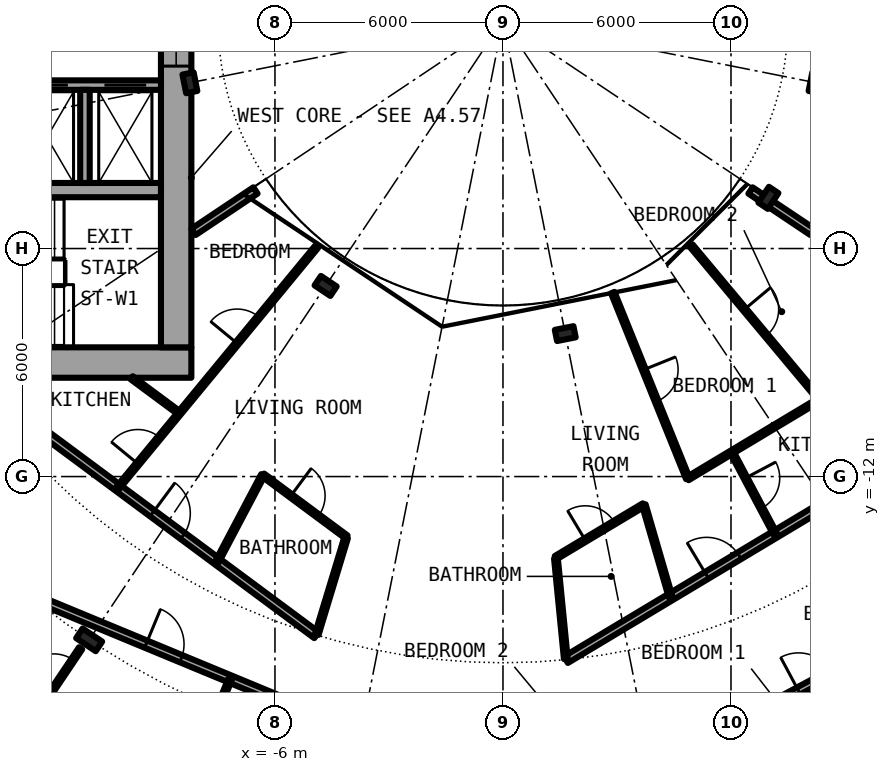
"""IFC4 building model, lengths in metres.
Left out: names, types, materials, properties, quantities, classifications, styles, units other than length and angle.
Written with IfcOpenShell. Run it as: python <this file> out.ifc"""

import sys

from ifc_helpers import new_model, si_unit, direction, frame, frame_2d, origin, origin_2d, place, context, subcontext, project, spatial, rectangle, i_section, extrude, element, fill, save


model = new_model("IFC4")
c1 = context("Model", 3, precision=1e-05, world=origin(), true_north=direction((0.0, 1.0)))
c2 = subcontext(c1, "Body", "Model", "MODEL_VIEW")
j1 = project(units=[si_unit("LENGTHUNIT", "METRE"), si_unit("PLANEANGLEUNIT", "RADIAN")], contexts=[c1])
p1 = place(None, origin())
s1 = spatial("IfcSite", under=j1, at=p1, CompositionType="ELEMENT")
p2 = place(p1, origin())
s2 = spatial("IfcBuilding", under=s1, at=p2, CompositionType="ELEMENT")
p3 = place(p2, frame((0.0, 0.0, 50.25)))
s3 = spatial("IfcBuildingStorey", under=s2, at=p3, CompositionType="ELEMENT", Elevation=50.25)
p4 = place(p3, frame((-10.889, -16.297, 0.0), z_axis=(0.0, 0.0, 1.0), x_axis=(-0.55557023302, -0.831469612303, 0.0)))
e1 = element("IfcColumn", 1, at=p4, inside=s3, PredefinedType="COLUMN", context=c2, shape_type="SweptSolid", body=[
    extrude(i_section(OverallWidth=0.305, OverallDepth=0.62, WebThickness=0.021, FlangeThickness=0.04, FilletRadius=0.027, at=origin_2d()), origin(), (0.0, 0.0, 1.0), 3.05),
])
for number, where, z_axis, x_axis in (
    (2, (-8.239, -1.639, 0.0), (0.0, 0.0, 1.0), (-0.981, -0.195, 0.0)),
    (3, (-4.667, -6.984, 0.0), (0.0, 0.0, 1.0), (-0.556, -0.831, 0.0)),
    (4, (1.639, -8.239, 0.0), (0.0, 0.0, 1.0), (0.195, -0.981, 0.0)),
    (5, (6.984, -4.667, 0.0), (0.0, 0.0, 1.0), (0.831, -0.556, 0.0)),
    (6, (8.239, -1.639, 0.0), (0.0, 0.0, 1.0), (0.981, -0.195, 0.0)),
):
    element("IfcColumn", number, at=place(p3, frame(where, z_axis=z_axis, x_axis=x_axis)), inside=s3, PredefinedType="COLUMN", context=c2, shape_type="SweptSolid", body=[
        extrude(i_section(OverallWidth=0.3, OverallDepth=0.5, WebThickness=0.014, FlangeThickness=0.028, FilletRadius=0.027, at=origin_2d()), origin(), (0.0, 0.0, 1.0), 3.05),
    ])
p5 = place(p3, frame((-22.4, -9.0, 0.0), z_axis=(0.0, 0.0, 1.0), x_axis=(1.0, 0.0, 0.0)))
e7 = element("IfcWall", 7, at=p5, inside=s3, PredefinedType="SHEAR", context=c2, shape_type="SweptSolid", body=[
    extrude(rectangle(XDim=14.2, YDim=0.8, at=frame_2d((7.1, 0.0))), origin(), (0.0, 0.0, 1.0), 3.05),
])
p6 = place(p5, frame((1.325, 0.0, 0.0)))
e8 = element("IfcOpeningElement", 8, at=p6, cuts=e7, PredefinedType="OPENING", context=c2, shape_type="SweptSolid", body=[
    extrude(rectangle(XDim=1.2, YDim=2.3, at=frame_2d((0.6, 1.15))), frame((0.0, 0.41, 0.0), z_axis=(0.0, -1.0, 0.0), x_axis=(1.0, 0.0, 0.0)), (0.0, 0.0, 1.0), 0.82),
])
p7 = place(p3, frame((-8.6, 8.6, 0.0), z_axis=(0.0, 0.0, 1.0), x_axis=(0.0, -1.0, 0.0)))
e9 = element("IfcWall", 9, at=p7, inside=s3, PredefinedType="SHEAR", context=c2, shape_type="SweptSolid", body=[
    extrude(rectangle(XDim=17.2, YDim=0.8, at=frame_2d((8.6, 0.0))), origin(), (0.0, 0.0, 1.0), 3.05),
])
p8 = place(p7, frame((7.4, 0.0, 0.1)))
e10 = element("IfcOpeningElement", 10, at=p8, cuts=e9, PredefinedType="OPENING", context=c2, shape_type="SweptSolid", body=[
    extrude(rectangle(XDim=2.4, YDim=2.2, at=frame_2d((1.2, 1.1))), frame((0.0, 0.41, 0.0), z_axis=(0.0, -1.0, 0.0), x_axis=(1.0, 0.0, 0.0)), (0.0, 0.0, 1.0), 0.82),
])
p9 = place(p3, frame((-9.0, -1.7, 0.0), z_axis=(0.0, 0.0, 1.0), x_axis=(-1.0, 0.0, 0.0)))
e11 = element("IfcWall", 11, at=p9, inside=s3, PredefinedType="SHEAR", context=c2, shape_type="SweptSolid", body=[
    extrude(rectangle(XDim=10.15, YDim=0.25, at=frame_2d((5.075, 0.0))), origin(), (0.0, 0.0, 1.0), 3.05),
])
p10 = place(p9, frame((0.387, 0.0, 0.0)))
e12 = element("IfcOpeningElement", 12, at=p10, cuts=e11, PredefinedType="OPENING", context=c2, shape_type="SweptSolid", body=[
    extrude(rectangle(XDim=1.1, YDim=2.3, at=frame_2d((0.55, 1.15))), frame((0.0, 0.135, 0.0), z_axis=(0.0, -1.0, 0.0), x_axis=(1.0, 0.0, 0.0)), (0.0, 0.0, 1.0), 0.27),
])
p11 = place(p9, frame((2.45, 0.0, 0.0)))
e13 = element("IfcOpeningElement", 13, at=p11, cuts=e11, PredefinedType="OPENING", context=c2, shape_type="SweptSolid", body=[
    extrude(rectangle(XDim=1.1, YDim=2.3, at=frame_2d((0.55, 1.15))), frame((0.0, 0.135, 0.0), z_axis=(0.0, -1.0, 0.0), x_axis=(1.0, 0.0, 0.0)), (0.0, 0.0, 1.0), 0.27),
])
p12 = place(p9, frame((4.45, 0.0, 0.0)))
e14 = element("IfcOpeningElement", 14, at=p12, cuts=e11, PredefinedType="OPENING", context=c2, shape_type="SweptSolid", body=[
    extrude(rectangle(XDim=1.1, YDim=2.3, at=frame_2d((0.55, 1.15))), frame((0.0, 0.135, 0.0), z_axis=(0.0, -1.0, 0.0), x_axis=(1.0, 0.0, 0.0)), (0.0, 0.0, 1.0), 0.27),
])
p13 = place(p3, frame((-9.0, -4.462, 0.0), z_axis=(0.0, 0.0, 1.0), x_axis=(-1.0, 0.0, 0.0)))
e15 = element("IfcWall", 15, at=p13, inside=s3, PredefinedType="SHEAR", context=c2, shape_type="SweptSolid", body=[
    extrude(rectangle(XDim=10.15, YDim=0.375, at=frame_2d((5.075, 0.0))), origin(), (0.0, 0.0, 1.0), 3.05),
])
p14 = place(p13, frame((6.6, 0.0, 0.0)))
e16 = element("IfcOpeningElement", 16, at=p14, cuts=e15, PredefinedType="OPENING", context=c2, shape_type="SweptSolid", body=[
    extrude(rectangle(XDim=1.1, YDim=2.3, at=frame_2d((0.55, 1.15))), frame((0.0, 0.198, 0.0), z_axis=(0.0, -1.0, 0.0), x_axis=(1.0, 0.0, 0.0)), (0.0, 0.0, 1.0), 0.395),
])
p15 = place(p3, frame((-11.0, -1.825, 0.0), z_axis=(0.0, 0.0, 1.0), x_axis=(0.0, -1.0, 0.0)))
e17 = element("IfcWall", 17, at=p15, inside=s3, PredefinedType="SOLIDWALL", context=c2, shape_type="SweptSolid", body=[
    extrude(rectangle(XDim=2.45, YDim=0.25, at=frame_2d((1.225, 0.0))), origin(), (0.0, 0.0, 1.0), 2.7),
])
p16 = place(p3, frame((5.69, -18.756, 0.0), z_axis=(0.0, 0.0, 1.0), x_axis=(0.881866548297, 0.471499089072, 0.0)))
e18 = element("IfcWall", 18, at=p16, inside=s3, PredefinedType="PARTITIONING", context=c2, shape_type="SweptSolid", body=[
    extrude(rectangle(XDim=5.563, YDim=0.2, at=frame_2d((2.782, 0.0))), origin(), (0.0, 0.0, 1.0), 2.38),
])
p17 = place(p16, frame((2.368, 0.0, 0.0)))
e19 = element("IfcOpeningElement", 19, at=p17, cuts=e18, PredefinedType="OPENING", context=c2, shape_type="SweptSolid", body=[
    extrude(rectangle(XDim=1.0, YDim=2.3, at=frame_2d((0.5, 1.15))), frame((0.0, 0.11, 0.0), z_axis=(0.0, -1.0, 0.0), x_axis=(1.0, 0.0, 0.0)), (0.0, 0.0, 1.0), 0.22),
])
p18 = place(p3, frame((-12.434, -15.151, 0.0), z_axis=(0.0, 0.0, 1.0), x_axis=(0.923888467236, -0.382661861319, 0.0)))
e20 = element("IfcWall", 20, at=p18, inside=s3, PredefinedType="PARTITIONING", context=c2, shape_type="SweptSolid", body=[
    extrude(rectangle(XDim=11.381, YDim=0.2, at=frame_2d((5.691, 0.0))), origin(), (0.0, 0.0, 1.0), 2.7),
])
p19 = place(p18, frame((3.292, 0.0, 0.0)))
e21 = element("IfcOpeningElement", 21, at=p19, cuts=e20, PredefinedType="OPENING", context=c2, shape_type="SweptSolid", body=[
    extrude(rectangle(XDim=1.0, YDim=2.3, at=frame_2d((0.5, 1.15))), frame((0.0, 0.11, 0.0), z_axis=(0.0, -1.0, 0.0), x_axis=(1.0, 0.0, 0.0)), (0.0, 0.0, 1.0), 0.22),
])
p20 = place(p3, frame((-14.037, -9.4, 0.0), z_axis=(0.0, 0.0, 1.0), x_axis=(0.803202106898, -0.595706618626, 0.0)))
e22 = element("IfcWall", 22, at=p20, inside=s3, PredefinedType="PARTITIONING", context=c2, shape_type="SweptSolid", body=[
    extrude(rectangle(XDim=11.368, YDim=0.2, at=frame_2d((5.684, 0.0))), origin(), (0.0, 0.0, 1.0), 2.7),
])
p21 = place(p20, frame((5.988, 0.0, 0.0)))
e23 = element("IfcOpeningElement", 23, at=p21, cuts=e22, PredefinedType="OPENING", context=c2, shape_type="SweptSolid", body=[
    extrude(rectangle(XDim=1.0, YDim=2.3, at=frame_2d((0.5, 1.15))), frame((0.0, 0.11, 0.0), z_axis=(0.0, -1.0, 0.0), x_axis=(1.0, 0.0, 0.0)), (0.0, 0.0, 1.0), 0.22),
])
p22 = place(p3, frame((1.656, -16.819, 0.0), z_axis=(0.0, 0.0, 1.0), x_axis=(0.857773470126, 0.514027892189, 0.0)))
e24 = element("IfcWall", 24, at=p22, inside=s3, PredefinedType="PARTITIONING", context=c2, shape_type="SweptSolid", body=[
    extrude(rectangle(XDim=14.429, YDim=0.2, at=frame_2d((7.215, 0.0))), origin(), (0.0, 0.0, 1.0), 2.7),
])
p23 = place(p22, frame((4.318, 0.0, 0.0)))
e25 = element("IfcOpeningElement", 25, at=p23, cuts=e24, PredefinedType="OPENING", context=c2, shape_type="SweptSolid", body=[
    extrude(rectangle(XDim=1.0, YDim=2.3, at=frame_2d((0.5, 1.15))), frame((0.0, 0.11, 0.0), z_axis=(0.0, -1.0, 0.0), x_axis=(1.0, 0.0, 0.0)), (0.0, 0.0, 1.0), 0.22),
])
p24 = place(p3, frame((-9.77, -9.4, 0.0), z_axis=(0.0, 0.0, 1.0), x_axis=(0.803264156882, -0.595622946392, 0.0)))
e26 = element("IfcWall", 26, at=p24, inside=s3, PredefinedType="PARTITIONING", context=c2, shape_type="SweptSolid", body=[
    extrude(rectangle(XDim=1.565, YDim=0.1, at=frame_2d((0.782, 0.0))), origin(), (0.0, 0.0, 1.0), 2.7),
])
p25 = place(p3, frame((-6.315, -11.961, 0.0), z_axis=(0.0, 0.0, 1.0), x_axis=(0.803128348509, -0.595806055542, 0.0)))
e27 = element("IfcWall", 27, at=p25, inside=s3, PredefinedType="PARTITIONING", context=c2, shape_type="SweptSolid", body=[
    extrude(rectangle(XDim=2.734, YDim=0.1, at=frame_2d((1.367, 0.0))), origin(), (0.0, 0.0, 1.0), 2.7),
])
p26 = place(p25, frame((0.914, 0.0, 0.0)))
e28 = element("IfcOpeningElement", 28, at=p26, cuts=e27, PredefinedType="OPENING", context=c2, shape_type="SweptSolid", body=[
    extrude(rectangle(XDim=0.9, YDim=2.3, at=frame_2d((0.45, 1.15))), frame((0.0, 0.06, 0.0), z_axis=(0.0, -1.0, 0.0), x_axis=(1.0, 0.0, 0.0)), (0.0, 0.0, 1.0), 0.12),
])
p27 = place(p3, frame((1.388, -14.134, 0.0), z_axis=(0.0, 0.0, 1.0), x_axis=(0.857820034452, 0.513950180945, 0.0)))
e29 = element("IfcWall", 29, at=p27, inside=s3, PredefinedType="PARTITIONING", context=c2, shape_type="SweptSolid", body=[
    extrude(rectangle(XDim=2.699, YDim=0.1, at=frame_2d((1.349, 0.0))), origin(), (0.0, 0.0, 1.0), 2.7),
])
p28 = place(p27, frame((0.904, 0.0, 0.0)))
e30 = element("IfcOpeningElement", 30, at=p28, cuts=e29, PredefinedType="OPENING", context=c2, shape_type="SweptSolid", body=[
    extrude(rectangle(XDim=0.9, YDim=2.3, at=frame_2d((0.45, 1.15))), frame((0.0, 0.06, 0.0), z_axis=(0.0, -1.0, 0.0), x_axis=(1.0, 0.0, 0.0)), (0.0, 0.0, 1.0), 0.12),
])
p29 = place(p3, frame((4.86, -12.053, 0.0), z_axis=(0.0, 0.0, 1.0), x_axis=(0.857697418837, 0.514154779926, 0.0)))
e31 = element("IfcWall", 31, at=p29, inside=s3, PredefinedType="PARTITIONING", context=c2, shape_type="SweptSolid", body=[
    extrude(rectangle(XDim=5.16, YDim=0.1, at=frame_2d((2.58, 0.0))), origin(), (0.0, 0.0, 1.0), 2.7),
])
for number, where, z_axis, x_axis in (
    (32, (-6.513, -4.472, 0.0), (0.0, 0.0, 1.0), (-0.831, -0.556, 0.0)),
    (33, (6.513, -4.472, 0.0), (0.0, 0.0, 1.0), (0.831, -0.556, 0.0)),
):
    element("IfcWall", number, at=place(p3, frame(where, z_axis=z_axis, x_axis=x_axis)), inside=s3, PredefinedType="PARTITIONING", context=c2, shape_type="SweptSolid", body=[
        extrude(rectangle(XDim=1.962, YDim=0.2, at=frame_2d((0.981, 0.0))), origin(), (0.0, 0.0, 1.0), 2.7),
    ])
p30 = place(p3, frame((-12.153, -18.064, 0.0), z_axis=(0.0, 0.0, 1.0), x_axis=(0.558084773293, 0.829783939239, 0.0)))
e34 = element("IfcWall", 34, at=p30, inside=s3, PredefinedType="PARTITIONING", context=c2, shape_type="SweptSolid", body=[
    extrude(rectangle(XDim=1.862, YDim=0.1, at=frame_2d((0.931, 0.0))), origin(), (0.0, 0.0, 1.0), 2.7),
])
p31 = place(p30, frame((0.6, 0.0, 0.0)))
e35 = element("IfcOpeningElement", 35, at=p31, cuts=e34, PredefinedType="OPENING", context=c2, shape_type="SweptSolid", body=[
    extrude(rectangle(XDim=0.9, YDim=2.3, at=frame_2d((0.45, 1.15))), frame((0.0, 0.06, 0.0), z_axis=(0.0, -1.0, 0.0), x_axis=(1.0, 0.0, 0.0)), (0.0, 0.0, 1.0), 0.12),
])
p32 = place(p3, frame((-10.399, -25.106, 0.0), z_axis=(0.0, 0.0, 1.0), x_axis=(0.382697543868, 0.923873687209, 0.0)))
e36 = element("IfcWall", 36, at=p32, inside=s3, PredefinedType="PARTITIONING", context=c2, shape_type="SweptSolid", body=[
    extrude(rectangle(XDim=8.419, YDim=0.1, at=frame_2d((4.209, 0.0))), origin(), (0.0, 0.0, 1.0), 2.7),
])
p33 = place(p32, frame((6.677, 0.0, 0.0)))
e37 = element("IfcOpeningElement", 37, at=p33, cuts=e36, PredefinedType="OPENING", context=c2, shape_type="SweptSolid", body=[
    extrude(rectangle(XDim=0.9, YDim=2.3, at=frame_2d((0.45, 1.15))), frame((0.0, 0.06, 0.0), z_axis=(0.0, -1.0, 0.0), x_axis=(1.0, 0.0, 0.0)), (0.0, 0.0, 1.0), 0.12),
])
p34 = place(p32, frame((2.468, 0.0, 0.0)))
e38 = element("IfcOpeningElement", 38, at=p34, cuts=e36, PredefinedType="OPENING", context=c2, shape_type="SweptSolid", body=[
    extrude(rectangle(XDim=0.9, YDim=2.3, at=frame_2d((0.45, 1.15))), frame((0.0, 0.06, 0.0), z_axis=(0.0, -1.0, 0.0), x_axis=(1.0, 0.0, 0.0)), (0.0, 0.0, 1.0), 0.12),
])
p35 = place(p3, frame((-10.132, -12.296, 0.0), z_axis=(0.0, 0.0, 1.0), x_axis=(0.636105207978, 0.771602335652, 0.0)))
e39 = element("IfcWall", 39, at=p35, inside=s3, PredefinedType="PARTITIONING", context=c2, shape_type="SweptSolid", body=[
    extrude(rectangle(XDim=8.213, YDim=0.1, at=frame_2d((4.106, 0.0))), origin(), (0.0, 0.0, 1.0), 2.7),
])
p36 = place(p35, frame((0.821, 0.0, 0.0)))
e40 = element("IfcOpeningElement", 40, at=p36, cuts=e39, PredefinedType="OPENING", context=c2, shape_type="SweptSolid", body=[
    extrude(rectangle(XDim=0.9, YDim=2.3, at=frame_2d((0.45, 1.15))), frame((0.0, 0.06, 0.0), z_axis=(0.0, -1.0, 0.0), x_axis=(1.0, 0.0, 0.0)), (0.0, 0.0, 1.0), 0.12),
])
p37 = place(p35, frame((4.929, 0.0, 0.0)))
e41 = element("IfcOpeningElement", 41, at=p37, cuts=e39, PredefinedType="OPENING", context=c2, shape_type="SweptSolid", body=[
    extrude(rectangle(XDim=0.9, YDim=2.3, at=frame_2d((0.45, 1.15))), frame((0.0, 0.06, 0.0), z_axis=(0.0, -1.0, 0.0), x_axis=(1.0, 0.0, 0.0)), (0.0, 0.0, 1.0), 0.12),
])
p38 = place(p3, frame((-7.519, -14.234, 0.0), z_axis=(0.0, 0.0, 1.0), x_axis=(0.467001992543, 0.884256263173, 0.0)))
e42 = element("IfcWall", 42, at=p38, inside=s3, PredefinedType="PARTITIONING", context=c2, shape_type="SweptSolid", body=[
    extrude(rectangle(XDim=2.572, YDim=0.1, at=frame_2d((1.286, 0.0))), origin(), (0.0, 0.0, 1.0), 2.7),
])
p39 = place(p3, frame((2.889, -7.159, 0.0), z_axis=(0.0, 0.0, 1.0), x_axis=(0.374372761824, -0.927278294367, 0.0)))
e43 = element("IfcWall", 43, at=p39, inside=s3, PredefinedType="PARTITIONING", context=c2, shape_type="SweptSolid", body=[
    extrude(rectangle(XDim=5.276, YDim=0.1, at=frame_2d((2.638, 0.0))), origin(), (0.0, 0.0, 1.0), 2.7),
])
p40 = place(p39, frame((2.188, 0.0, 0.0)))
e44 = element("IfcOpeningElement", 44, at=p40, cuts=e43, PredefinedType="OPENING", context=c2, shape_type="SweptSolid", body=[
    extrude(rectangle(XDim=0.9, YDim=2.3, at=frame_2d((0.45, 1.15))), frame((0.0, 0.06, 0.0), z_axis=(0.0, -1.0, 0.0), x_axis=(1.0, 0.0, 0.0)), (0.0, 0.0, 1.0), 0.12),
])
p41 = place(p3, frame((3.706, -12.744, 0.0), z_axis=(0.0, 0.0, 1.0), x_axis=(0.279201466266, -0.960232545395, 0.0)))
e45 = element("IfcWall", 45, at=p41, inside=s3, PredefinedType="PARTITIONING", context=c2, shape_type="SweptSolid", body=[
    extrude(rectangle(XDim=2.524, YDim=0.1, at=frame_2d((1.262, 0.0))), origin(), (0.0, 0.0, 1.0), 2.7),
])
p42 = place(p3, frame((4.952, -5.923, 0.0), z_axis=(0.0, 0.0, 1.0), x_axis=(0.641376424834, -0.767226356213, 0.0)))
e46 = element("IfcWall", 46, at=p42, inside=s3, PredefinedType="PARTITIONING", context=c2, shape_type="SweptSolid", body=[
    extrude(rectangle(XDim=5.275, YDim=0.1, at=frame_2d((2.637, 0.0))), origin(), (0.0, 0.0, 1.0), 2.7),
])
p43 = place(p42, frame((2.187, 0.0, 0.0)))
e47 = element("IfcOpeningElement", 47, at=p43, cuts=e46, PredefinedType="OPENING", context=c2, shape_type="SweptSolid", body=[
    extrude(rectangle(XDim=0.9, YDim=2.3, at=frame_2d((0.45, 1.15))), frame((0.0, 0.06, 0.0), z_axis=(0.0, -1.0, 0.0), x_axis=(1.0, 0.0, 0.0)), (0.0, 0.0, 1.0), 0.12),
])
p44 = place(p3, frame((6.021, -11.357, 0.0), z_axis=(0.0, 0.0, 1.0), x_axis=(0.468337293896, -0.883549760425, 0.0)))
e48 = element("IfcWall", 48, at=p44, inside=s3, PredefinedType="PARTITIONING", context=c2, shape_type="SweptSolid", body=[
    extrude(rectangle(XDim=2.445, YDim=0.1, at=frame_2d((1.222, 0.0))), origin(), (0.0, 0.0, 1.0), 2.7),
])
p45 = place(p44, frame((0.772, 0.0, 0.0)))
e49 = element("IfcOpeningElement", 49, at=p45, cuts=e48, PredefinedType="OPENING", context=c2, shape_type="SweptSolid", body=[
    extrude(rectangle(XDim=0.9, YDim=2.3, at=frame_2d((0.45, 1.15))), frame((0.0, 0.06, 0.0), z_axis=(0.0, -1.0, 0.0), x_axis=(1.0, 0.0, 0.0)), (0.0, 0.0, 1.0), 0.12),
])
p46 = place(p3, frame((-4.128, -13.609, 0.0), z_axis=(0.0, 0.0, 1.0), x_axis=(-0.290456070925, -0.956888327269, 0.0)))
e50 = element("IfcWall", 50, at=p46, inside=s3, PredefinedType="PARTITIONING", context=c2, shape_type="SweptSolid", body=[
    extrude(rectangle(XDim=2.658, YDim=0.1, at=frame_2d((1.329, 0.0))), origin(), (0.0, 0.0, 1.0), 2.7),
])
p47 = place(p3, frame((1.654, -16.797, 0.0), z_axis=(0.0, 0.0, 1.0), x_axis=(-0.097901702875, 0.995196089509, 0.0)))
e51 = element("IfcWall", 51, at=p47, inside=s3, PredefinedType="PARTITIONING", context=c2, shape_type="SweptSolid", body=[
    extrude(rectangle(XDim=2.656, YDim=0.1, at=frame_2d((1.328, 0.0))), origin(), (0.0, 0.0, 1.0), 2.7),
])
p48 = place(p10, origin())
e52 = element("IfcDoor", 52, at=p48, inside=s3, OperationType="DOUBLE_DOOR_SLIDING", PredefinedType="DOOR", context=c2, shape_type="SweptSolid", body=[
    extrude(rectangle(XDim=1.1, YDim=2.3, at=frame_2d((0.55, 1.15))), frame((0.0, 0.025, 0.0), z_axis=(0.0, -1.0, 0.0), x_axis=(1.0, 0.0, 0.0)), (0.0, 0.0, 1.0), 0.05),
])
fill(e12, e52)
p49 = place(p11, origin())
e53 = element("IfcDoor", 53, at=p49, inside=s3, OperationType="DOUBLE_DOOR_SLIDING", PredefinedType="DOOR", context=c2, shape_type="SweptSolid", body=[
    extrude(rectangle(XDim=1.1, YDim=2.3, at=frame_2d((0.55, 1.15))), frame((0.0, 0.025, 0.0), z_axis=(0.0, -1.0, 0.0), x_axis=(1.0, 0.0, 0.0)), (0.0, 0.0, 1.0), 0.05),
])
fill(e13, e53)
p50 = place(p8, origin())
e54 = element("IfcWindow", 54, at=p50, inside=s3, PartitioningType="SINGLE_PANEL", PredefinedType="WINDOW", context=c2, shape_type="SweptSolid", body=[
    extrude(rectangle(XDim=2.4, YDim=2.2, at=frame_2d((1.2, 1.1))), frame((0.0, 0.03, 0.0), z_axis=(0.0, -1.0, 0.0), x_axis=(1.0, 0.0, 0.0)), (0.0, 0.0, 1.0), 0.06),
])
fill(e10, e54)
p51 = place(p19, origin())
e55 = element("IfcDoor", 55, at=p51, inside=s3, OperationType="SINGLE_SWING_LEFT", PredefinedType="DOOR", context=c2, shape_type="SweptSolid", body=[
    extrude(rectangle(XDim=1.0, YDim=2.3, at=frame_2d((0.5, 1.15))), frame((0.0, 0.025, 0.0), z_axis=(0.0, -1.0, 0.0), x_axis=(1.0, 0.0, 0.0)), (0.0, 0.0, 1.0), 0.05),
])
fill(e21, e55)
p52 = place(p31, origin())
e56 = element("IfcDoor", 56, at=p52, inside=s3, OperationType="SINGLE_SWING_RIGHT", PredefinedType="DOOR", context=c2, shape_type="SweptSolid", body=[
    extrude(rectangle(XDim=0.9, YDim=2.3, at=frame_2d((0.45, 1.15))), frame((0.0, 0.025, 0.0), z_axis=(0.0, -1.0, 0.0), x_axis=(1.0, 0.0, 0.0)), (0.0, 0.0, 1.0), 0.05),
])
fill(e35, e56)
p53 = place(p17, origin())
e57 = element("IfcDoor", 57, at=p53, inside=s3, OperationType="SINGLE_SWING_RIGHT", PredefinedType="DOOR", context=c2, shape_type="SweptSolid", body=[
    extrude(rectangle(XDim=1.0, YDim=2.3, at=frame_2d((0.5, 1.15))), frame((0.0, 0.025, 0.0), z_axis=(0.0, -1.0, 0.0), x_axis=(1.0, 0.0, 0.0)), (0.0, 0.0, 1.0), 0.05),
])
fill(e19, e57)
p54 = place(p21, origin())
e58 = element("IfcDoor", 58, at=p54, inside=s3, OperationType="SINGLE_SWING_RIGHT", PredefinedType="DOOR", context=c2, shape_type="SweptSolid", body=[
    extrude(rectangle(XDim=1.0, YDim=2.3, at=frame_2d((0.5, 1.15))), frame((0.0, 0.025, 0.0), z_axis=(0.0, -1.0, 0.0), x_axis=(1.0, 0.0, 0.0)), (0.0, 0.0, 1.0), 0.05),
])
fill(e23, e58)
p55 = place(p26, origin())
e59 = element("IfcDoor", 59, at=p55, inside=s3, OperationType="SINGLE_SWING_LEFT", PredefinedType="DOOR", context=c2, shape_type="SweptSolid", body=[
    extrude(rectangle(XDim=0.9, YDim=2.3, at=frame_2d((0.45, 1.15))), frame((0.0, 0.025, 0.0), z_axis=(0.0, -1.0, 0.0), x_axis=(1.0, 0.0, 0.0)), (0.0, 0.0, 1.0), 0.05),
])
fill(e28, e59)
p56 = place(p36, origin())
e60 = element("IfcDoor", 60, at=p56, inside=s3, OperationType="SINGLE_SWING_LEFT", PredefinedType="DOOR", context=c2, shape_type="SweptSolid", body=[
    extrude(rectangle(XDim=0.9, YDim=2.3, at=frame_2d((0.45, 1.15))), frame((0.0, 0.025, 0.0), z_axis=(0.0, -1.0, 0.0), x_axis=(1.0, 0.0, 0.0)), (0.0, 0.0, 1.0), 0.05),
])
fill(e40, e60)
p57 = place(p37, origin())
e61 = element("IfcDoor", 61, at=p57, inside=s3, OperationType="SINGLE_SWING_RIGHT", PredefinedType="DOOR", context=c2, shape_type="SweptSolid", body=[
    extrude(rectangle(XDim=0.9, YDim=2.3, at=frame_2d((0.45, 1.15))), frame((0.0, 0.025, 0.0), z_axis=(0.0, -1.0, 0.0), x_axis=(1.0, 0.0, 0.0)), (0.0, 0.0, 1.0), 0.05),
])
fill(e41, e61)
p58 = place(p23, origin())
e62 = element("IfcDoor", 62, at=p58, inside=s3, OperationType="SINGLE_SWING_LEFT", PredefinedType="DOOR", context=c2, shape_type="SweptSolid", body=[
    extrude(rectangle(XDim=1.0, YDim=2.3, at=frame_2d((0.5, 1.15))), frame((0.0, 0.025, 0.0), z_axis=(0.0, -1.0, 0.0), x_axis=(1.0, 0.0, 0.0)), (0.0, 0.0, 1.0), 0.05),
])
fill(e25, e62)
p59 = place(p28, origin())
e63 = element("IfcDoor", 63, at=p59, inside=s3, OperationType="SINGLE_SWING_RIGHT", PredefinedType="DOOR", context=c2, shape_type="SweptSolid", body=[
    extrude(rectangle(XDim=0.9, YDim=2.3, at=frame_2d((0.45, 1.15))), frame((0.0, 0.025, 0.0), z_axis=(0.0, -1.0, 0.0), x_axis=(1.0, 0.0, 0.0)), (0.0, 0.0, 1.0), 0.05),
])
fill(e30, e63)
p60 = place(p45, origin())
e64 = element("IfcDoor", 64, at=p60, inside=s3, OperationType="SINGLE_SWING_RIGHT", PredefinedType="DOOR", context=c2, shape_type="SweptSolid", body=[
    extrude(rectangle(XDim=0.9, YDim=2.3, at=frame_2d((0.45, 1.15))), frame((0.0, 0.025, 0.0), z_axis=(0.0, -1.0, 0.0), x_axis=(1.0, 0.0, 0.0)), (0.0, 0.0, 1.0), 0.05),
])
fill(e49, e64)
p61 = place(p40, origin())
e65 = element("IfcDoor", 65, at=p61, inside=s3, OperationType="SINGLE_SWING_RIGHT", PredefinedType="DOOR", context=c2, shape_type="SweptSolid", body=[
    extrude(rectangle(XDim=0.9, YDim=2.3, at=frame_2d((0.45, 1.15))), frame((0.0, 0.025, 0.0), z_axis=(0.0, -1.0, 0.0), x_axis=(1.0, 0.0, 0.0)), (0.0, 0.0, 1.0), 0.05),
])
fill(e44, e65)
p62 = place(p43, origin())
e66 = element("IfcDoor", 66, at=p62, inside=s3, OperationType="SINGLE_SWING_RIGHT", PredefinedType="DOOR", context=c2, shape_type="SweptSolid", body=[
    extrude(rectangle(XDim=0.9, YDim=2.3, at=frame_2d((0.45, 1.15))), frame((0.0, 0.025, 0.0), z_axis=(0.0, -1.0, 0.0), x_axis=(1.0, 0.0, 0.0)), (0.0, 0.0, 1.0), 0.05),
])
fill(e47, e66)
save(model, sys.argv[1])
